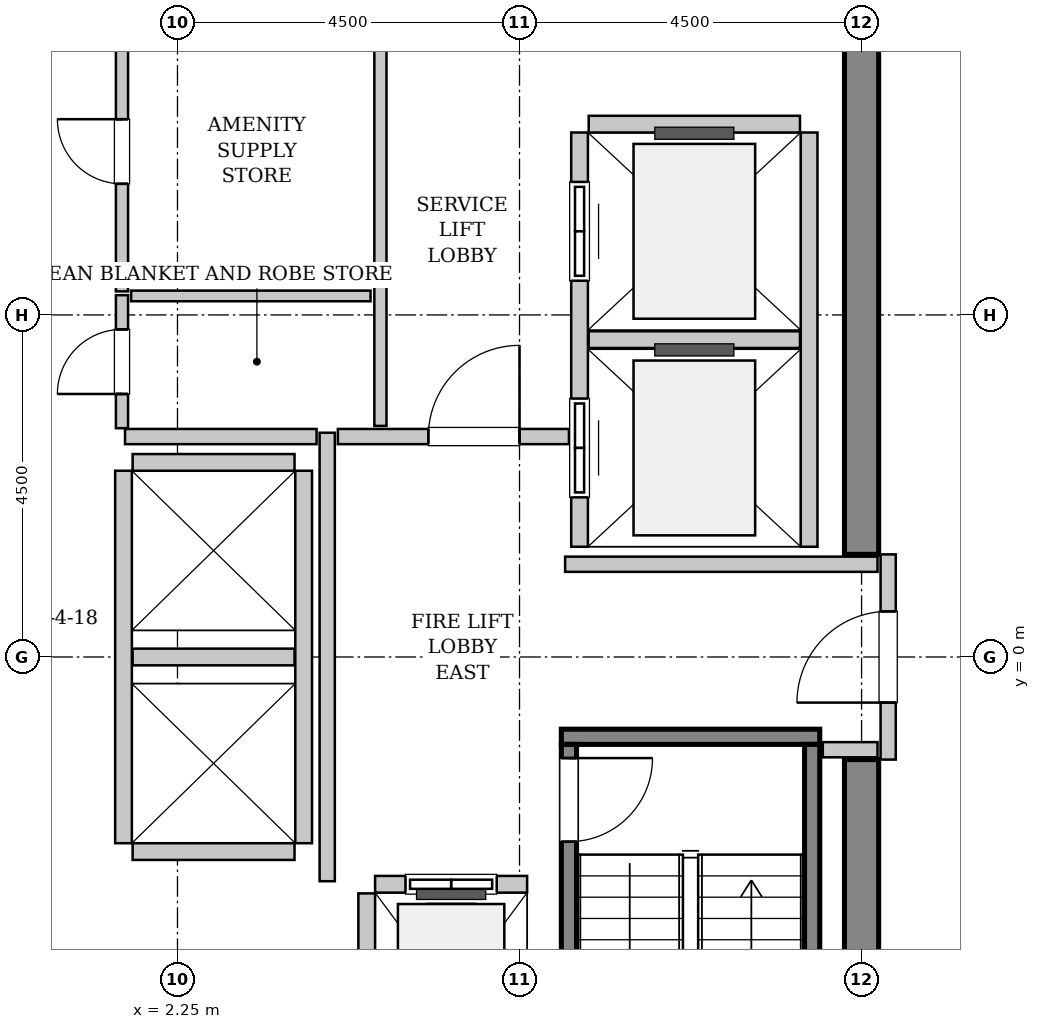
"""IFC4 building model, lengths in metres.
Left out: names, types, materials, properties, quantities, classifications, styles, units other than length and angle.
Written with IfcOpenShell. Run it as: python <this file> out.ifc"""

import sys

from ifc_helpers import new_model, si_unit, direction, frame, frame_2d, origin, place, context, subcontext, project, spatial, rectangle, extrude, source, transform, mapped, element, fill, save


model = new_model("IFC4")
c1 = context("Model", 3, precision=1e-05, world=origin(), true_north=direction((0.0, 1.0)))
c2 = subcontext(c1, "Body", "Model", "MODEL_VIEW")
j1 = project(units=[si_unit("LENGTHUNIT", "METRE"), si_unit("PLANEANGLEUNIT", "RADIAN")], contexts=[c1])
p1 = place(None, origin())
s1 = spatial("IfcSite", under=j1, at=p1, CompositionType="ELEMENT")
p2 = place(p1, origin())
s2 = spatial("IfcBuilding", under=s1, at=p2, CompositionType="ELEMENT")
p3 = place(p2, frame((0.0, 0.0, 248.4)))
s3 = spatial("IfcBuildingStorey", under=s2, at=p3, CompositionType="ELEMENT", Elevation=248.4)
m1 = source(origin(), c2, "Body", "SweptSolid", [
    extrude(rectangle(XDim=7.425, YDim=0.45, at=frame_2d((3.712, 0.0))), origin(), (0.0, 0.0, 1.0), 3.8),
])
for number, where, z_axis, x_axis in (
    (1, (11.25, -8.775, 0.0), (0.0, 0.0, 1.0), (0.0, 1.0, 0.0)),
    (2, (11.25, 1.35, 0.0), (0.0, 0.0, 1.0), (0.0, 1.0, 0.0)),
):
    element("IfcWall", number, at=place(p3, frame(where, z_axis=z_axis, x_axis=x_axis)), inside=s3, PredefinedType="SHEAR", context=c2, shape_type="MappedRepresentation", body=[
        mapped(m1, transform((0.0, 0.0, 0.0), x_axis=(1.0, 0.0, 0.0), y_axis=(0.0, 1.0, 0.0), z_axis=(0.0, 0.0, 1.0), scale=1.0)),
    ])
m2 = source(origin(), c2, "Body", "SweptSolid", [
    extrude(rectangle(XDim=3.4, YDim=0.2, at=frame_2d((1.7, 0.0))), origin(), (0.0, 0.0, 1.0), 3.8),
])
p4 = place(p3, frame((7.3, -1.05, 0.0), z_axis=(0.0, 0.0, 1.0), x_axis=(1.0, 0.0, 0.0)))
e3 = element("IfcWall", 3, at=p4, inside=s3, PredefinedType="SOLIDWALL", context=c2, shape_type="MappedRepresentation", body=[
    mapped(m2, transform((0.0, 0.0, 0.0), x_axis=(1.0, 0.0, 0.0), y_axis=(0.0, 1.0, 0.0), z_axis=(0.0, 0.0, 1.0), scale=1.0)),
])
m3 = source(origin(), c2, "Body", "SweptSolid", [
    extrude(rectangle(XDim=7.1, YDim=0.2, at=frame_2d((3.55, 0.0))), origin(), (0.0, 0.0, 1.0), 3.8),
])
p5 = place(p3, frame((7.4, -1.15, 0.0), z_axis=(0.0, 0.0, 1.0), x_axis=(0.0, -1.0, 0.0)))
e4 = element("IfcWall", 4, at=p5, inside=s3, PredefinedType="SOLIDWALL", context=c2, shape_type="MappedRepresentation", body=[
    mapped(m3, transform((0.0, 0.0, 0.0), x_axis=(1.0, 0.0, 0.0), y_axis=(0.0, 1.0, 0.0), z_axis=(0.0, 0.0, 1.0), scale=1.0)),
])
p6 = place(p5, frame((0.18, 0.0, 0.0)))
e5 = element("IfcOpeningElement", 5, at=p6, cuts=e4, PredefinedType="OPENING", context=c2, shape_type="SweptSolid", body=[
    extrude(rectangle(XDim=1.1, YDim=2.15, at=frame_2d((0.55, 1.075))), frame((0.0, 0.11, 0.0), z_axis=(0.0, -1.0, 0.0), x_axis=(1.0, 0.0, 0.0)), (0.0, 0.0, 1.0), 0.22),
])
p7 = place(p3, frame((10.6, -1.15, 0.0), z_axis=(0.0, 0.0, 1.0), x_axis=(0.0, -1.0, 0.0)))
e6 = element("IfcWall", 6, at=p7, inside=s3, PredefinedType="SOLIDWALL", context=c2, shape_type="MappedRepresentation", body=[
    mapped(m3, transform((0.0, 0.0, 0.0), x_axis=(1.0, 0.0, 0.0), y_axis=(0.0, 1.0, 0.0), z_axis=(0.0, 0.0, 1.0), scale=1.0)),
])
m4 = source(origin(), c2, "Body", "SweptSolid", [
    extrude(rectangle(XDim=2.0, YDim=0.22, at=frame_2d((1.0, 0.0))), origin(), (0.0, 0.0, 1.0), 3.535),
])
p8 = place(p3, frame((6.85, -2.99, 0.0), z_axis=(0.0, 0.0, 1.0), x_axis=(-1.0, 0.0, 0.0)))
e7 = element("IfcWall", 7, at=p8, inside=s3, PredefinedType="SOLIDWALL", context=c2, shape_type="MappedRepresentation", body=[
    mapped(m4, transform((0.0, 0.0, 0.0), x_axis=(1.0, 0.0, 0.0), y_axis=(0.0, 1.0, 0.0), z_axis=(0.0, 0.0, 1.0), scale=1.0)),
])
p9 = place(p8, frame((0.4, 0.0, 0.0)))
e8 = element("IfcOpeningElement", 8, at=p9, cuts=e7, PredefinedType="OPENING", context=c2, shape_type="SweptSolid", body=[
    extrude(rectangle(XDim=1.2, YDim=2.2, at=frame_2d((0.6, 1.1))), frame((0.0, 0.12, 0.0), z_axis=(0.0, -1.0, 0.0), x_axis=(1.0, 0.0, 0.0)), (0.0, 0.0, 1.0), 0.24),
])
m5 = source(origin(), c2, "Body", "SweptSolid", [
    extrude(rectangle(XDim=2.68, YDim=0.22, at=frame_2d((1.34, 0.0))), origin(), (0.0, 0.0, 1.0), 3.535),
])
p10 = place(p3, frame((4.74, -3.11, 0.0), z_axis=(0.0, 0.0, 1.0), x_axis=(0.0, -1.0, 0.0)))
e9 = element("IfcWall", 9, at=p10, inside=s3, PredefinedType="SOLIDWALL", context=c2, shape_type="MappedRepresentation", body=[
    mapped(m5, transform((0.0, 0.0, 0.0), x_axis=(1.0, 0.0, 0.0), y_axis=(0.0, 1.0, 0.0), z_axis=(0.0, 0.0, 1.0), scale=1.0)),
])
m6 = source(origin(), c2, "Body", "SweptSolid", [
    extrude(rectangle(XDim=5.45, YDim=0.22, at=frame_2d((2.725, 0.0))), origin(), (0.0, 0.0, 1.0), 3.535),
])
p11 = place(p3, frame((7.54, 6.9, 0.0), z_axis=(0.0, 0.0, 1.0), x_axis=(0.0, -1.0, 0.0)))
e10 = element("IfcWall", 10, at=p11, inside=s3, PredefinedType="SOLIDWALL", context=c2, shape_type="MappedRepresentation", body=[
    mapped(m6, transform((0.0, 0.0, 0.0), x_axis=(1.0, 0.0, 0.0), y_axis=(0.0, 1.0, 0.0), z_axis=(0.0, 0.0, 1.0), scale=1.0)),
])
p12 = place(p11, frame((3.5, 0.0, 0.0)))
e11 = element("IfcOpeningElement", 11, at=p12, cuts=e10, PredefinedType="OPENING", context=c2, shape_type="SweptSolid", body=[
    extrude(rectangle(XDim=1.3, YDim=2.3, at=frame_2d((0.65, 1.15))), frame((0.0, 0.12, 0.0), z_axis=(0.0, -1.0, 0.0), x_axis=(1.0, 0.0, 0.0)), (0.0, 0.0, 1.0), 0.24),
])
p13 = place(p11, frame((0.65, 0.0, 0.0)))
e12 = element("IfcOpeningElement", 12, at=p13, cuts=e10, PredefinedType="OPENING", context=c2, shape_type="SweptSolid", body=[
    extrude(rectangle(XDim=1.3, YDim=2.3, at=frame_2d((0.65, 1.15))), frame((0.0, 0.12, 0.0), z_axis=(0.0, -1.0, 0.0), x_axis=(1.0, 0.0, 0.0)), (0.0, 0.0, 1.0), 0.24),
])
p14 = place(p3, frame((10.56, 1.45, 0.0), z_axis=(0.0, 0.0, 1.0), x_axis=(0.0, 1.0, 0.0)))
e13 = element("IfcWall", 13, at=p14, inside=s3, PredefinedType="SOLIDWALL", context=c2, shape_type="MappedRepresentation", body=[
    mapped(m6, transform((0.0, 0.0, 0.0), x_axis=(1.0, 0.0, 0.0), y_axis=(0.0, 1.0, 0.0), z_axis=(0.0, 0.0, 1.0), scale=1.0)),
])
m7 = source(origin(), c2, "Body", "SweptSolid", [
    extrude(rectangle(XDim=2.78, YDim=0.22, at=frame_2d((1.39, 0.0))), origin(), (0.0, 0.0, 1.0), 3.535),
])
for number, where, z_axis, x_axis in (
    (14, (7.66, 4.175, 0.0), (0.0, 0.0, 1.0), (1.0, 0.0, 0.0)),
    (15, (10.44, 7.01, 0.0), (0.0, 0.0, 1.0), (-1.0, 0.0, 0.0)),
):
    element("IfcWall", number, at=place(p3, frame(where, z_axis=z_axis, x_axis=x_axis)), inside=s3, PredefinedType="SOLIDWALL", context=c2, shape_type="MappedRepresentation", body=[
        mapped(m7, transform((0.0, 0.0, 0.0), x_axis=(1.0, 0.0, 0.0), y_axis=(0.0, 1.0, 0.0), z_axis=(0.0, 0.0, 1.0), scale=1.0)),
    ])
m8 = source(origin(), c2, "Body", "SweptSolid", [
    extrude(rectangle(XDim=4.9, YDim=0.22, at=frame_2d((2.45, 0.0))), origin(), (0.0, 0.0, 1.0), 3.535),
])
for number, where, z_axis, x_axis in (
    (16, (1.54, 2.45, 0.0), (0.0, 0.0, 1.0), (0.0, -1.0, 0.0)),
    (17, (3.91, -2.45, 0.0), (0.0, 0.0, 1.0), (0.0, 1.0, 0.0)),
):
    element("IfcWall", number, at=place(p3, frame(where, z_axis=z_axis, x_axis=x_axis)), inside=s3, PredefinedType="SOLIDWALL", context=c2, shape_type="MappedRepresentation", body=[
        mapped(m8, transform((0.0, 0.0, 0.0), x_axis=(1.0, 0.0, 0.0), y_axis=(0.0, 1.0, 0.0), z_axis=(0.0, 0.0, 1.0), scale=1.0)),
    ])
m9 = source(origin(), c2, "Body", "SweptSolid", [
    extrude(rectangle(XDim=2.13, YDim=0.22, at=frame_2d((1.065, 0.0))), origin(), (0.0, 0.0, 1.0), 3.535),
])
for number, where, z_axis, x_axis in (
    (18, (1.66, -2.56, 0.0), (0.0, 0.0, 1.0), (1.0, 0.0, 0.0)),
    (19, (1.66, 0.0, 0.0), (0.0, 0.0, 1.0), (1.0, 0.0, 0.0)),
    (20, (3.79, 2.56, 0.0), (0.0, 0.0, 1.0), (-1.0, 0.0, 0.0)),
):
    element("IfcWall", number, at=place(p3, frame(where, z_axis=z_axis, x_axis=x_axis)), inside=s3, PredefinedType="SOLIDWALL", context=c2, shape_type="MappedRepresentation", body=[
        mapped(m9, transform((0.0, 0.0, 0.0), x_axis=(1.0, 0.0, 0.0), y_axis=(0.0, 1.0, 0.0), z_axis=(0.0, 0.0, 1.0), scale=1.0)),
    ])
m10 = source(origin(), c2, "Body", "SweptSolid", [
    extrude(rectangle(XDim=2.7, YDim=0.2, at=frame_2d((1.35, 0.0))), origin(), (0.0, 0.0, 1.0), 2.625),
])
p15 = place(p3, frame((11.6, -1.35, 0.0), z_axis=(0.0, 0.0, 1.0), x_axis=(0.0, 1.0, 0.0)))
e21 = element("IfcWall", 21, at=p15, inside=s3, PredefinedType="PARTITIONING", context=c2, shape_type="MappedRepresentation", body=[
    mapped(m10, transform((0.0, 0.0, 0.0), x_axis=(1.0, 0.0, 0.0), y_axis=(0.0, 1.0, 0.0), z_axis=(0.0, 0.0, 1.0), scale=1.0)),
])
p16 = place(p15, frame((0.75, 0.0, 0.0)))
e22 = element("IfcOpeningElement", 22, at=p16, cuts=e21, PredefinedType="OPENING", context=c2, shape_type="SweptSolid", body=[
    extrude(rectangle(XDim=1.2, YDim=2.15, at=frame_2d((0.6, 1.075))), frame((0.0, 0.11, 0.0), z_axis=(0.0, -1.0, 0.0), x_axis=(1.0, 0.0, 0.0)), (0.0, 0.0, 1.0), 0.22),
])
m11 = source(origin(), c2, "Body", "SweptSolid", [
    extrude(rectangle(XDim=5.9, YDim=0.2, at=frame_2d((2.95, 0.0))), origin(), (0.0, 0.0, 1.0), 3.535),
])
p17 = place(p3, frame((4.22, -2.95, 0.0), z_axis=(0.0, 0.0, 1.0), x_axis=(0.0, 1.0, 0.0)))
e23 = element("IfcWall", 23, at=p17, inside=s3, PredefinedType="PARTITIONING", context=c2, shape_type="MappedRepresentation", body=[
    mapped(m11, transform((0.0, 0.0, 0.0), x_axis=(1.0, 0.0, 0.0), y_axis=(0.0, 1.0, 0.0), z_axis=(0.0, 0.0, 1.0), scale=1.0)),
])
m12 = source(origin(), c2, "Body", "SweptSolid", [
    extrude(rectangle(XDim=2.52, YDim=0.2, at=frame_2d((1.26, 0.0))), origin(), (0.0, 0.0, 1.0), 3.535),
])
p18 = place(p3, frame((1.56, 2.9, 0.0), z_axis=(0.0, 0.0, 1.0), x_axis=(1.0, 0.0, 0.0)))
e24 = element("IfcWall", 24, at=p18, inside=s3, PredefinedType="PARTITIONING", context=c2, shape_type="MappedRepresentation", body=[
    mapped(m12, transform((0.0, 0.0, 0.0), x_axis=(1.0, 0.0, 0.0), y_axis=(0.0, 1.0, 0.0), z_axis=(0.0, 0.0, 1.0), scale=1.0)),
])
m13 = source(origin(), c2, "Body", "SweptSolid", [
    extrude(rectangle(XDim=3.04, YDim=0.2, at=frame_2d((1.52, 0.0))), origin(), (0.0, 0.0, 1.0), 3.535),
])
p19 = place(p3, frame((4.36, 2.9, 0.0), z_axis=(0.0, 0.0, 1.0), x_axis=(1.0, 0.0, 0.0)))
e25 = element("IfcWall", 25, at=p19, inside=s3, PredefinedType="PARTITIONING", context=c2, shape_type="MappedRepresentation", body=[
    mapped(m13, transform((0.0, 0.0, 0.0), x_axis=(1.0, 0.0, 0.0), y_axis=(0.0, 1.0, 0.0), z_axis=(0.0, 0.0, 1.0), scale=1.0)),
])
p20 = place(p19, frame((1.19, 0.0, 0.0)))
e26 = element("IfcOpeningElement", 26, at=p20, cuts=e25, PredefinedType="OPENING", context=c2, shape_type="SweptSolid", body=[
    extrude(rectangle(XDim=1.2, YDim=2.15, at=frame_2d((0.6, 1.075))), frame((0.0, 0.11, 0.0), z_axis=(0.0, -1.0, 0.0), x_axis=(1.0, 0.0, 0.0)), (0.0, 0.0, 1.0), 0.22),
])
m14 = source(origin(), c2, "Body", "SweptSolid", [
    extrude(rectangle(XDim=4.11, YDim=0.2, at=frame_2d((2.055, 0.0))), origin(), (0.0, 0.0, 1.0), 3.535),
])
p21 = place(p3, frame((7.35, 1.22, 0.0), z_axis=(0.0, 0.0, 1.0), x_axis=(1.0, 0.0, 0.0)))
e27 = element("IfcWall", 27, at=p21, inside=s3, PredefinedType="PARTITIONING", context=c2, shape_type="MappedRepresentation", body=[
    mapped(m14, transform((0.0, 0.0, 0.0), x_axis=(1.0, 0.0, 0.0), y_axis=(0.0, 1.0, 0.0), z_axis=(0.0, 0.0, 1.0), scale=1.0)),
])
m15 = source(origin(), c2, "Body", "SweptSolid", [
    extrude(rectangle(XDim=0.72, YDim=0.2, at=frame_2d((0.36, 0.0))), origin(), (0.0, 0.0, 1.0), 3.535),
])
p22 = place(p3, frame((10.74, -1.22, 0.0), z_axis=(0.0, 0.0, 1.0), x_axis=(1.0, 0.0, 0.0)))
e28 = element("IfcWall", 28, at=p22, inside=s3, PredefinedType="PARTITIONING", context=c2, shape_type="MappedRepresentation", body=[
    mapped(m15, transform((0.0, 0.0, 0.0), x_axis=(1.0, 0.0, 0.0), y_axis=(0.0, 1.0, 0.0), z_axis=(0.0, 0.0, 1.0), scale=1.0)),
])
m16 = source(origin(), c2, "Body", "SweptSolid", [
    extrude(rectangle(XDim=5.45, YDim=0.16, at=frame_2d((2.725, 0.0))), origin(), (0.0, 0.0, 1.0), 3.535),
])
p23 = place(p3, frame((4.92, 3.04, 0.0), z_axis=(0.0, 0.0, 1.0), x_axis=(0.0, 1.0, 0.0)))
e29 = element("IfcWall", 29, at=p23, inside=s3, PredefinedType="PARTITIONING", context=c2, shape_type="MappedRepresentation", body=[
    mapped(m16, transform((0.0, 0.0, 0.0), x_axis=(1.0, 0.0, 0.0), y_axis=(0.0, 1.0, 0.0), z_axis=(0.0, 0.0, 1.0), scale=1.0)),
])
m17 = source(origin(), c2, "Body", "SweptSolid", [
    extrude(rectangle(XDim=1.75, YDim=0.16, at=frame_2d((0.875, 0.0))), origin(), (0.0, 0.0, 1.0), 3.535),
])
p24 = place(p3, frame((1.52, 3.01, 0.0), z_axis=(0.0, 0.0, 1.0), x_axis=(0.0, 1.0, 0.0)))
e30 = element("IfcWall", 30, at=p24, inside=s3, PredefinedType="PARTITIONING", context=c2, shape_type="MappedRepresentation", body=[
    mapped(m17, transform((0.0, 0.0, 0.0), x_axis=(1.0, 0.0, 0.0), y_axis=(0.0, 1.0, 0.0), z_axis=(0.0, 0.0, 1.0), scale=1.0)),
])
p25 = place(p24, frame((0.45, 0.0, 0.0)))
e31 = element("IfcOpeningElement", 31, at=p25, cuts=e30, PredefinedType="OPENING", context=c2, shape_type="SweptSolid", body=[
    extrude(rectangle(XDim=0.85, YDim=2.1, at=frame_2d((0.425, 1.05))), frame((0.0, 0.09, 0.0), z_axis=(0.0, -1.0, 0.0), x_axis=(1.0, 0.0, 0.0)), (0.0, 0.0, 1.0), 0.18),
])
m18 = source(origin(), c2, "Body", "SweptSolid", [
    extrude(rectangle(XDim=3.15, YDim=0.14, at=frame_2d((1.575, 0.0))), origin(), (0.0, 0.0, 1.0), 3.535),
])
p26 = place(p3, frame((1.64, 4.75, 0.0), z_axis=(0.0, 0.0, 1.0), x_axis=(1.0, 0.0, 0.0)))
e32 = element("IfcWall", 32, at=p26, inside=s3, PredefinedType="PARTITIONING", context=c2, shape_type="MappedRepresentation", body=[
    mapped(m18, transform((0.0, 0.0, 0.0), x_axis=(1.0, 0.0, 0.0), y_axis=(0.0, 1.0, 0.0), z_axis=(0.0, 0.0, 1.0), scale=1.0)),
])
m19 = source(origin(), c2, "Body", "SweptSolid", [
    extrude(rectangle(XDim=3.68, YDim=0.16, at=frame_2d((1.84, 0.0))), origin(), (0.0, 0.0, 1.0), 3.535),
])
p27 = place(p3, frame((1.52, 4.81, 0.0), z_axis=(0.0, 0.0, 1.0), x_axis=(0.0, 1.0, 0.0)))
e33 = element("IfcWall", 33, at=p27, inside=s3, PredefinedType="PARTITIONING", context=c2, shape_type="MappedRepresentation", body=[
    mapped(m19, transform((0.0, 0.0, 0.0), x_axis=(1.0, 0.0, 0.0), y_axis=(0.0, 1.0, 0.0), z_axis=(0.0, 0.0, 1.0), scale=1.0)),
])
p28 = place(p27, frame((1.415, 0.0, 0.0)))
e34 = element("IfcOpeningElement", 34, at=p28, cuts=e33, PredefinedType="OPENING", context=c2, shape_type="SweptSolid", body=[
    extrude(rectangle(XDim=0.85, YDim=2.1, at=frame_2d((0.425, 1.05))), frame((0.0, 0.09, 0.0), z_axis=(0.0, -1.0, 0.0), x_axis=(1.0, 0.0, 0.0)), (0.0, 0.0, 1.0), 0.18),
])
m20 = source(origin(), c2, "Body", "SweptSolid", [
    extrude(rectangle(XDim=1.1, YDim=2.15, at=frame_2d((0.55, 1.075))), frame((0.0, 0.025, 0.0), z_axis=(0.0, -1.0, 0.0), x_axis=(1.0, 0.0, 0.0)), (0.0, 0.0, 1.0), 0.05),
])
p29 = place(p6, origin())
e35 = element("IfcDoor", 35, at=p29, inside=s3, OperationType="SINGLE_SWING_LEFT", PredefinedType="DOOR", context=c2, shape_type="MappedRepresentation", body=[
    mapped(m20, transform((0.0, 0.0, 0.0), x_axis=(1.0, 0.0, 0.0), y_axis=(0.0, 1.0, 0.0), z_axis=(0.0, 0.0, 1.0), scale=1.0)),
])
fill(e5, e35)
m21 = source(origin(), c2, "Body", "SweptSolid", [
    extrude(rectangle(XDim=1.2, YDim=2.2, at=frame_2d((0.6, 1.1))), frame((0.0, 0.025, 0.0), z_axis=(0.0, -1.0, 0.0), x_axis=(1.0, 0.0, 0.0)), (0.0, 0.0, 1.0), 0.05),
])
p30 = place(p9, origin())
e36 = element("IfcDoor", 36, at=p30, inside=s3, OperationType="SLIDING_TO_LEFT", PredefinedType="DOOR", context=c2, shape_type="MappedRepresentation", body=[
    mapped(m21, transform((0.0, 0.0, 0.0), x_axis=(1.0, 0.0, 0.0), y_axis=(0.0, 1.0, 0.0), z_axis=(0.0, 0.0, 1.0), scale=1.0)),
])
fill(e8, e36)
m22 = source(origin(), c2, "Body", "SweptSolid", [
    extrude(rectangle(XDim=1.3, YDim=2.3, at=frame_2d((0.65, 1.15))), frame((0.0, 0.025, 0.0), z_axis=(0.0, -1.0, 0.0), x_axis=(1.0, 0.0, 0.0)), (0.0, 0.0, 1.0), 0.05),
])
p31 = place(p12, origin())
e37 = element("IfcDoor", 37, at=p31, inside=s3, OperationType="SLIDING_TO_RIGHT", PredefinedType="DOOR", context=c2, shape_type="MappedRepresentation", body=[
    mapped(m22, transform((0.0, 0.0, 0.0), x_axis=(1.0, 0.0, 0.0), y_axis=(0.0, 1.0, 0.0), z_axis=(0.0, 0.0, 1.0), scale=1.0)),
])
fill(e11, e37)
p32 = place(p13, origin())
e38 = element("IfcDoor", 38, at=p32, inside=s3, OperationType="SLIDING_TO_RIGHT", PredefinedType="DOOR", context=c2, shape_type="MappedRepresentation", body=[
    mapped(m22, transform((0.0, 0.0, 0.0), x_axis=(1.0, 0.0, 0.0), y_axis=(0.0, 1.0, 0.0), z_axis=(0.0, 0.0, 1.0), scale=1.0)),
])
fill(e12, e38)
m23 = source(origin(), c2, "Body", "SweptSolid", [
    extrude(rectangle(XDim=1.2, YDim=2.15, at=frame_2d((0.6, 1.075))), frame((0.0, 0.025, 0.0), z_axis=(0.0, -1.0, 0.0), x_axis=(1.0, 0.0, 0.0)), (0.0, 0.0, 1.0), 0.05),
])
p33 = place(p16, origin())
e39 = element("IfcDoor", 39, at=p33, inside=s3, OperationType="SINGLE_SWING_LEFT", PredefinedType="DOOR", context=c2, shape_type="MappedRepresentation", body=[
    mapped(m23, transform((0.0, 0.0, 0.0), x_axis=(1.0, 0.0, 0.0), y_axis=(0.0, 1.0, 0.0), z_axis=(0.0, 0.0, 1.0), scale=1.0)),
])
fill(e22, e39)
p34 = place(p20, origin())
e40 = element("IfcDoor", 40, at=p34, inside=s3, OperationType="SINGLE_SWING_RIGHT", PredefinedType="DOOR", context=c2, shape_type="MappedRepresentation", body=[
    mapped(m23, transform((0.0, 0.0, 0.0), x_axis=(1.0, 0.0, 0.0), y_axis=(0.0, 1.0, 0.0), z_axis=(0.0, 0.0, 1.0), scale=1.0)),
])
fill(e26, e40)
m24 = source(origin(), c2, "Body", "SweptSolid", [
    extrude(rectangle(XDim=0.85, YDim=2.1, at=frame_2d((0.425, 1.05))), frame((0.0, 0.025, 0.0), z_axis=(0.0, -1.0, 0.0), x_axis=(1.0, 0.0, 0.0)), (0.0, 0.0, 1.0), 0.05),
])
p35 = place(p25, origin())
e41 = element("IfcDoor", 41, at=p35, inside=s3, OperationType="SINGLE_SWING_LEFT", PredefinedType="DOOR", context=c2, shape_type="MappedRepresentation", body=[
    mapped(m24, transform((0.0, 0.0, 0.0), x_axis=(1.0, 0.0, 0.0), y_axis=(0.0, 1.0, 0.0), z_axis=(0.0, 0.0, 1.0), scale=1.0)),
])
fill(e31, e41)
p36 = place(p28, origin())
e42 = element("IfcDoor", 42, at=p36, inside=s3, OperationType="SINGLE_SWING_RIGHT", PredefinedType="DOOR", context=c2, shape_type="MappedRepresentation", body=[
    mapped(m24, transform((0.0, 0.0, 0.0), x_axis=(1.0, 0.0, 0.0), y_axis=(0.0, 1.0, 0.0), z_axis=(0.0, 0.0, 1.0), scale=1.0)),
])
fill(e34, e42)
save(model, sys.argv[1])
